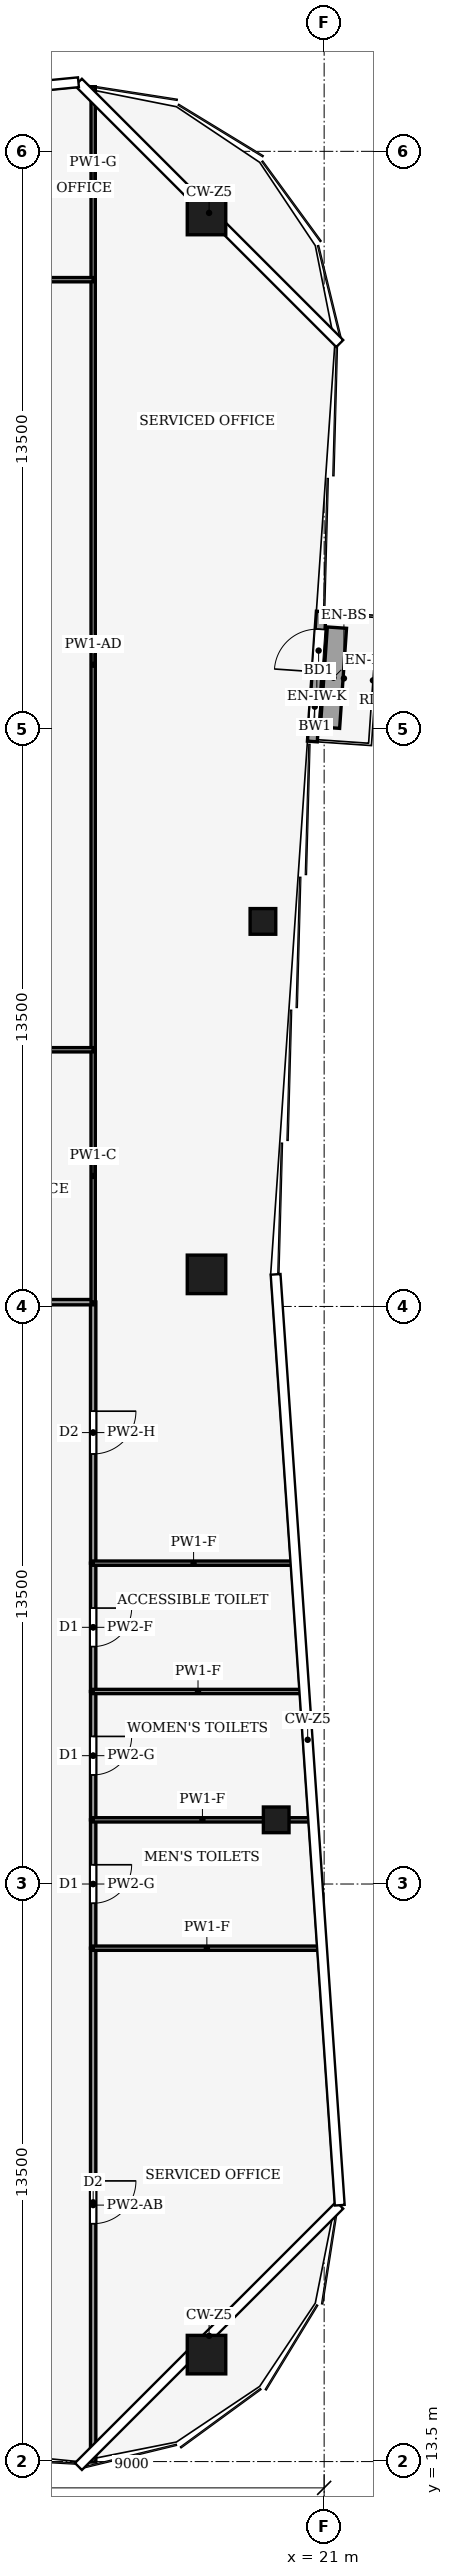
"""IFC4 building model, lengths in metres.
Left out: names, types, materials, properties, quantities, classifications, styles, units other than length and angle.
Written with IfcOpenShell. Run it as: python <this file> out.ifc"""

import sys

from ifc_helpers import new_model, si_unit, direction, frame, frame_2d, origin, origin_2d, place, context, subcontext, project, spatial, rectangle, hollow_rectangle, extrude, element, fill, save


model = new_model("IFC4")
c1 = context("Model", 3, precision=1e-05, world=origin(), true_north=direction((0.0, 1.0)))
c2 = subcontext(c1, "Body", "Model", "MODEL_VIEW")
j1 = project(units=[si_unit("LENGTHUNIT", "METRE"), si_unit("PLANEANGLEUNIT", "RADIAN")], contexts=[c1])
p1 = place(None, origin())
s1 = spatial("IfcSite", under=j1, at=p1, CompositionType="ELEMENT")
p2 = place(p1, origin())
s2 = spatial("IfcBuilding", under=s1, at=p2, CompositionType="ELEMENT")
p3 = place(p2, frame((0.0, 0.0, 298.0)))
s3 = spatial("IfcBuildingStorey", under=s2, at=p3, CompositionType="ELEMENT", Elevation=298.0)
for number, where, z_axis, x_axis in (
    (1, (18.25, 66.0, 0.0), (0.0, 0.0, 1.0), (1.0, 0.0, 0.0)),
    (2, (18.25, 41.25, 0.0), (0.0, 0.0, 1.0), (1.0, 0.0, 0.0)),
    (3, (18.25, 16.0, 0.0), (0.0, 0.0, 1.0), (1.0, 0.0, 0.0)),
):
    element("IfcColumn", number, at=place(p3, frame(where, z_axis=z_axis, x_axis=x_axis)), inside=s3, PredefinedType="COLUMN", context=c2, shape_type="SweptSolid", body=[
        extrude(hollow_rectangle(XDim=0.9, YDim=0.9, WallThickness=0.04, at=origin_2d()), origin(), (0.0, 0.0, 1.0), 4.0),
    ])
for number, where, z_axis, x_axis in (
    (4, (19.879, 28.5, 0.0), (0.0, 0.0, 1.0), (1.0, 0.0, 0.0)),
    (5, (19.569, 49.5, 0.0), (0.0, 0.0, 1.0), (1.0, 0.0, 0.0)),
):
    element("IfcColumn", number, at=place(p3, frame(where, z_axis=z_axis, x_axis=x_axis)), inside=s3, PredefinedType="COLUMN", context=c2, shape_type="SweptSolid", body=[
        extrude(hollow_rectangle(XDim=0.6, YDim=0.6, WallThickness=0.025, at=origin_2d()), origin(), (0.0, 0.0, 1.0), 4.0),
    ])
p4 = place(p3, frame((20.724, 53.706, 0.0), z_axis=(0.0, 0.0, 1.0), x_axis=(0.068802091615, 0.997630328423, 0.0)))
e6 = element("IfcWall", 6, at=p4, inside=s3, PredefinedType="SOLIDWALL", context=c2, shape_type="SweptSolid", body=[
    extrude(rectangle(XDim=3.045, YDim=0.23, at=frame_2d((1.522, 0.0))), origin(), (0.0, 0.0, 1.0), 3.65),
])
p5 = place(p4, frame((1.63, 0.0, 0.0)))
e7 = element("IfcOpeningElement", 7, at=p5, cuts=e6, PredefinedType="OPENING", context=c2, shape_type="SweptSolid", body=[
    extrude(rectangle(XDim=1.0, YDim=2.1, at=frame_2d((0.5, 1.05))), frame((0.0, 0.125, 0.0), z_axis=(0.0, -1.0, 0.0), x_axis=(1.0, 0.0, 0.0)), (0.0, 0.0, 1.0), 0.25),
])
p6 = place(p4, frame((0.415, 0.0, 0.9)))
e8 = element("IfcOpeningElement", 8, at=p6, cuts=e6, PredefinedType="OPENING", context=c2, shape_type="SweptSolid", body=[
    extrude(rectangle(XDim=0.8, YDim=1.2, at=frame_2d((0.4, 0.6))), frame((0.0, 0.125, 0.0), z_axis=(0.0, -1.0, 0.0), x_axis=(1.0, 0.0, 0.0)), (0.0, 0.0, 1.0), 0.25),
])
p7 = place(p3, frame((21.137, 54.028, 0.0), z_axis=(0.0, 0.0, 1.0), x_axis=(0.068827106414, 0.997628602949, 0.0)))
e9 = element("IfcWall", 9, at=p7, inside=s3, PredefinedType="USERDEFINED", context=c2, shape_type="SweptSolid", body=[
    extrude(rectangle(XDim=2.345, YDim=0.45, at=frame_2d((1.172, 0.0))), origin(), (0.0, 0.0, 1.0), 0.4),
])
p8 = place(p3, frame((15.6, 25.5, 0.0), z_axis=(0.0, 0.0, 1.0), x_axis=(0.0, -1.0, 0.0)))
e10 = element("IfcWall", 10, at=p8, inside=s3, PredefinedType="PARTITIONING", context=c2, shape_type="SweptSolid", body=[
    extrude(rectangle(XDim=12.01, YDim=0.125, at=frame_2d((6.005, 0.0))), origin(), (0.0, 0.0, 1.0), 2.93),
])
p9 = place(p8, frame((5.44, 0.0, 0.0)))
e11 = element("IfcOpeningElement", 11, at=p9, cuts=e10, PredefinedType="OPENING", context=c2, shape_type="SweptSolid", body=[
    extrude(rectangle(XDim=1.0, YDim=2.1, at=frame_2d((0.5, 1.05))), frame((0.0, 0.073, 0.0), z_axis=(0.0, -1.0, 0.0), x_axis=(1.0, 0.0, 0.0)), (0.0, 0.0, 1.0), 0.145),
])
p10 = place(p3, frame((15.6, 28.5, 0.0), z_axis=(0.0, 0.0, 1.0), x_axis=(0.0, -1.0, 0.0)))
e12 = element("IfcWall", 12, at=p10, inside=s3, PredefinedType="PARTITIONING", context=c2, shape_type="SweptSolid", body=[
    extrude(rectangle(XDim=3.0, YDim=0.125, at=frame_2d((1.5, 0.0))), origin(), (0.0, 0.0, 1.0), 3.87),
])
p11 = place(p10, frame((1.05, 0.0, 0.0)))
e13 = element("IfcOpeningElement", 13, at=p11, cuts=e12, PredefinedType="OPENING", context=c2, shape_type="SweptSolid", body=[
    extrude(rectangle(XDim=0.9, YDim=2.1, at=frame_2d((0.45, 1.05))), frame((0.0, 0.073, 0.0), z_axis=(0.0, -1.0, 0.0), x_axis=(1.0, 0.0, 0.0)), (0.0, 0.0, 1.0), 0.145),
])
p12 = place(p3, frame((15.6, 31.5, 0.0), z_axis=(0.0, 0.0, 1.0), x_axis=(0.0, -1.0, 0.0)))
e14 = element("IfcWall", 14, at=p12, inside=s3, PredefinedType="PARTITIONING", context=c2, shape_type="SweptSolid", body=[
    extrude(rectangle(XDim=3.0, YDim=0.125, at=frame_2d((1.5, 0.0))), origin(), (0.0, 0.0, 1.0), 3.87),
])
p13 = place(p12, frame((1.05, 0.0, 0.0)))
e15 = element("IfcOpeningElement", 15, at=p13, cuts=e14, PredefinedType="OPENING", context=c2, shape_type="SweptSolid", body=[
    extrude(rectangle(XDim=0.9, YDim=2.1, at=frame_2d((0.45, 1.05))), frame((0.0, 0.073, 0.0), z_axis=(0.0, -1.0, 0.0), x_axis=(1.0, 0.0, 0.0)), (0.0, 0.0, 1.0), 0.145),
])
p14 = place(p3, frame((15.6, 34.5, 0.0), z_axis=(0.0, 0.0, 1.0), x_axis=(0.0, -1.0, 0.0)))
e16 = element("IfcWall", 16, at=p14, inside=s3, PredefinedType="PARTITIONING", context=c2, shape_type="SweptSolid", body=[
    extrude(rectangle(XDim=3.0, YDim=0.125, at=frame_2d((1.5, 0.0))), origin(), (0.0, 0.0, 1.0), 3.54),
])
p15 = place(p14, frame((1.05, 0.0, 0.0)))
e17 = element("IfcOpeningElement", 17, at=p15, cuts=e16, PredefinedType="OPENING", context=c2, shape_type="SweptSolid", body=[
    extrude(rectangle(XDim=0.9, YDim=2.1, at=frame_2d((0.45, 1.05))), frame((0.0, 0.073, 0.0), z_axis=(0.0, -1.0, 0.0), x_axis=(1.0, 0.0, 0.0)), (0.0, 0.0, 1.0), 0.145),
])
p16 = place(p3, frame((15.6, 40.604, 0.0), z_axis=(0.0, 0.0, 1.0), x_axis=(0.0, -1.0, 0.0)))
e18 = element("IfcWall", 18, at=p16, inside=s3, PredefinedType="PARTITIONING", context=c2, shape_type="SweptSolid", body=[
    extrude(rectangle(XDim=6.104, YDim=0.125, at=frame_2d((3.052, 0.0))), origin(), (0.0, 0.0, 1.0), 3.14),
])
p17 = place(p16, frame((2.552, 0.0, 0.0)))
e19 = element("IfcOpeningElement", 19, at=p17, cuts=e18, PredefinedType="OPENING", context=c2, shape_type="SweptSolid", body=[
    extrude(rectangle(XDim=1.0, YDim=2.1, at=frame_2d((0.5, 1.05))), frame((0.0, 0.073, 0.0), z_axis=(0.0, -1.0, 0.0), x_axis=(1.0, 0.0, 0.0)), (0.0, 0.0, 1.0), 0.145),
])
p18 = place(p3, frame((9.0, 40.6, 0.0), z_axis=(0.0, 0.0, 1.0), x_axis=(1.0, 0.0, 0.0)))
e20 = element("IfcWall", 20, at=p18, inside=s3, PredefinedType="PARTITIONING", context=c2, shape_type="SweptSolid", body=[
    extrude(rectangle(XDim=6.6, YDim=0.125, at=frame_2d((3.3, 0.0))), origin(), (0.0, 0.0, 1.0), 3.39),
])
p19 = place(p18, frame((2.8, 0.0, 0.0)))
e21 = element("IfcOpeningElement", 21, at=p19, cuts=e20, PredefinedType="OPENING", context=c2, shape_type="SweptSolid", body=[
    extrude(rectangle(XDim=1.0, YDim=2.1, at=frame_2d((0.5, 1.05))), frame((0.0, 0.073, 0.0), z_axis=(0.0, -1.0, 0.0), x_axis=(1.0, 0.0, 0.0)), (0.0, 0.0, 1.0), 0.145),
])
p20 = place(p3, frame((20.916, 25.5, 0.0), z_axis=(0.0, 0.0, 1.0), x_axis=(-1.0, 0.0, 0.0)))
e22 = element("IfcWall", 22, at=p20, inside=s3, PredefinedType="PARTITIONING", context=c2, shape_type="SweptSolid", body=[
    extrude(rectangle(XDim=5.316, YDim=0.1, at=frame_2d((2.658, 0.0))), origin(), (0.0, 0.0, 1.0), 3.04),
])
p21 = place(p3, frame((20.709, 28.5, 0.0), z_axis=(0.0, 0.0, 1.0), x_axis=(-1.0, 0.0, 0.0)))
e23 = element("IfcWall", 23, at=p21, inside=s3, PredefinedType="PARTITIONING", context=c2, shape_type="SweptSolid", body=[
    extrude(rectangle(XDim=5.109, YDim=0.1, at=frame_2d((2.555, 0.0))), origin(), (0.0, 0.0, 1.0), 3.04),
])
p22 = place(p3, frame((20.502, 31.5, 0.0), z_axis=(0.0, 0.0, 1.0), x_axis=(-1.0, 0.0, 0.0)))
e24 = element("IfcWall", 24, at=p22, inside=s3, PredefinedType="PARTITIONING", context=c2, shape_type="SweptSolid", body=[
    extrude(rectangle(XDim=4.902, YDim=0.1, at=frame_2d((2.451, 0.0))), origin(), (0.0, 0.0, 1.0), 3.04),
])
p23 = place(p3, frame((20.295, 34.5, 0.0), z_axis=(0.0, 0.0, 1.0), x_axis=(-1.0, 0.0, 0.0)))
e25 = element("IfcWall", 25, at=p23, inside=s3, PredefinedType="PARTITIONING", context=c2, shape_type="SweptSolid", body=[
    extrude(rectangle(XDim=4.695, YDim=0.1, at=frame_2d((2.348, 0.0))), origin(), (0.0, 0.0, 1.0), 3.04),
])
p24 = place(p3, frame((15.6, 46.5, 0.0), z_axis=(0.0, 0.0, 1.0), x_axis=(0.0, -1.0, 0.0)))
e26 = element("IfcWall", 26, at=p24, inside=s3, PredefinedType="PARTITIONING", context=c2, shape_type="SweptSolid", body=[
    extrude(rectangle(XDim=5.9, YDim=0.1, at=frame_2d((2.95, 0.0))), origin(), (0.0, 0.0, 1.0), 3.87),
])
p25 = place(p3, frame((15.6, 64.5, 0.0), z_axis=(0.0, 0.0, 1.0), x_axis=(0.0, -1.0, 0.0)))
e27 = element("IfcWall", 27, at=p25, inside=s3, PredefinedType="PARTITIONING", context=c2, shape_type="SweptSolid", body=[
    extrude(rectangle(XDim=18.0, YDim=0.1, at=frame_2d((9.0, 0.0))), origin(), (0.0, 0.0, 1.0), 3.35),
])
p26 = place(p3, frame((15.6, 69.01, 0.0), z_axis=(0.0, 0.0, 1.0), x_axis=(0.0, -1.0, 0.0)))
e28 = element("IfcWall", 28, at=p26, inside=s3, PredefinedType="PARTITIONING", context=c2, shape_type="SweptSolid", body=[
    extrude(rectangle(XDim=4.51, YDim=0.1, at=frame_2d((2.255, 0.0))), origin(), (0.0, 0.0, 1.0), 2.93),
])
p27 = place(p3, frame((15.6, 46.5, 0.0), z_axis=(0.0, 0.0, 1.0), x_axis=(-1.0, 0.0, 0.0)))
e29 = element("IfcWall", 29, at=p27, inside=s3, PredefinedType="PARTITIONING", context=c2, shape_type="SweptSolid", body=[
    extrude(rectangle(XDim=6.604, YDim=0.1, at=frame_2d((3.302, 0.0))), origin(), (0.0, 0.0, 1.0), 3.39),
])
p28 = place(p3, frame((3.0, 64.5, 0.0), z_axis=(0.0, 0.0, 1.0), x_axis=(1.0, 0.0, 0.0)))
e30 = element("IfcWall", 30, at=p28, inside=s3, PredefinedType="PARTITIONING", context=c2, shape_type="SweptSolid", body=[
    extrude(rectangle(XDim=12.6, YDim=0.1, at=frame_2d((6.3, 0.0))), origin(), (0.0, 0.0, 1.0), 3.24),
])
p29 = place(p28, frame((5.8, 0.0, 0.0)))
e31 = element("IfcOpeningElement", 31, at=p29, cuts=e30, PredefinedType="OPENING", context=c2, shape_type="SweptSolid", body=[
    extrude(rectangle(XDim=1.0, YDim=2.1, at=frame_2d((0.5, 1.05))), frame((0.0, 0.06, 0.0), z_axis=(0.0, -1.0, 0.0), x_axis=(1.0, 0.0, 0.0)), (0.0, 0.0, 1.0), 0.12),
])
p30 = place(p5, origin())
e32 = element("IfcDoor", 32, at=p30, inside=s3, OperationType="SINGLE_SWING_RIGHT", PredefinedType="DOOR", context=c2, shape_type="SweptSolid", body=[
    extrude(rectangle(XDim=1.0, YDim=2.1, at=frame_2d((0.5, 1.05))), frame((0.0, 0.025, 0.0), z_axis=(0.0, -1.0, 0.0), x_axis=(1.0, 0.0, 0.0)), (0.0, 0.0, 1.0), 0.05),
])
fill(e7, e32)
p31 = place(p6, origin())
e33 = element("IfcWindow", 33, at=p31, inside=s3, PartitioningType="SINGLE_PANEL", PredefinedType="WINDOW", context=c2, shape_type="SweptSolid", body=[
    extrude(rectangle(XDim=0.8, YDim=1.2, at=frame_2d((0.4, 0.6))), frame((0.0, 0.03, 0.0), z_axis=(0.0, -1.0, 0.0), x_axis=(1.0, 0.0, 0.0)), (0.0, 0.0, 1.0), 0.06),
])
fill(e8, e33)
p32 = place(p9, origin())
e34 = element("IfcDoor", 34, at=p32, inside=s3, OperationType="SINGLE_SWING_LEFT", PredefinedType="DOOR", context=c2, shape_type="SweptSolid", body=[
    extrude(rectangle(XDim=1.0, YDim=2.1, at=frame_2d((0.5, 1.05))), frame((0.0, 0.025, 0.0), z_axis=(0.0, -1.0, 0.0), x_axis=(1.0, 0.0, 0.0)), (0.0, 0.0, 1.0), 0.05),
])
fill(e11, e34)
p33 = place(p11, origin())
e35 = element("IfcDoor", 35, at=p33, inside=s3, OperationType="SINGLE_SWING_LEFT", PredefinedType="DOOR", context=c2, shape_type="SweptSolid", body=[
    extrude(rectangle(XDim=0.9, YDim=2.1, at=frame_2d((0.45, 1.05))), frame((0.0, 0.025, 0.0), z_axis=(0.0, -1.0, 0.0), x_axis=(1.0, 0.0, 0.0)), (0.0, 0.0, 1.0), 0.05),
])
fill(e13, e35)
p34 = place(p13, origin())
e36 = element("IfcDoor", 36, at=p34, inside=s3, OperationType="SINGLE_SWING_RIGHT", PredefinedType="DOOR", context=c2, shape_type="SweptSolid", body=[
    extrude(rectangle(XDim=0.9, YDim=2.1, at=frame_2d((0.45, 1.05))), frame((0.0, 0.025, 0.0), z_axis=(0.0, -1.0, 0.0), x_axis=(1.0, 0.0, 0.0)), (0.0, 0.0, 1.0), 0.05),
])
fill(e15, e36)
p35 = place(p15, origin())
e37 = element("IfcDoor", 37, at=p35, inside=s3, OperationType="SINGLE_SWING_LEFT", PredefinedType="DOOR", context=c2, shape_type="SweptSolid", body=[
    extrude(rectangle(XDim=0.9, YDim=2.1, at=frame_2d((0.45, 1.05))), frame((0.0, 0.025, 0.0), z_axis=(0.0, -1.0, 0.0), x_axis=(1.0, 0.0, 0.0)), (0.0, 0.0, 1.0), 0.05),
])
fill(e17, e37)
p36 = place(p17, origin())
e38 = element("IfcDoor", 38, at=p36, inside=s3, OperationType="SINGLE_SWING_RIGHT", PredefinedType="DOOR", context=c2, shape_type="SweptSolid", body=[
    extrude(rectangle(XDim=1.0, YDim=2.1, at=frame_2d((0.5, 1.05))), frame((0.0, 0.025, 0.0), z_axis=(0.0, -1.0, 0.0), x_axis=(1.0, 0.0, 0.0)), (0.0, 0.0, 1.0), 0.05),
])
fill(e19, e38)
save(model, sys.argv[1])
